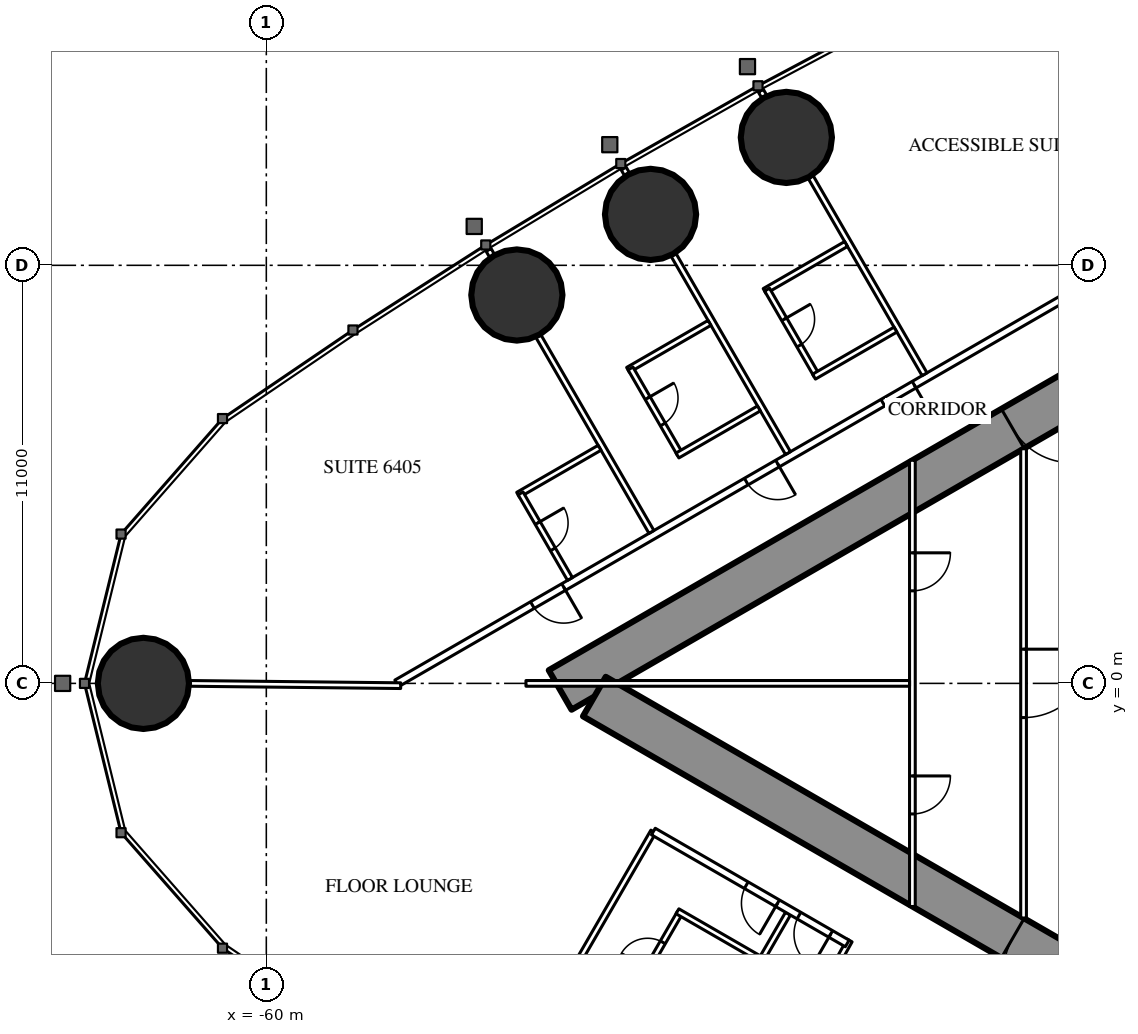
"""IFC4 building model, lengths in metres.
Left out: names, types, materials, properties, quantities, classifications, styles, units other than length and angle.
Written with IfcOpenShell. Run it as: python <this file> out.ifc"""

import sys

from ifc_helpers import new_model, si_unit, direction, frame, frame_2d, origin, origin_2d, place, context, subcontext, project, spatial, rectangle, circle, extrude, element, fill, save


model = new_model("IFC4")
c1 = context("Model", 3, precision=1e-05, world=origin(), true_north=direction((0.0, 1.0)))
c2 = subcontext(c1, "Body", "Model", "MODEL_VIEW")
j1 = project(units=[si_unit("LENGTHUNIT", "METRE"), si_unit("PLANEANGLEUNIT", "RADIAN")], contexts=[c1])
p1 = place(None, origin())
s1 = spatial("IfcSite", under=j1, at=p1, CompositionType="ELEMENT")
p2 = place(p1, origin())
s2 = spatial("IfcBuilding", under=s1, at=p2, CompositionType="ELEMENT")
p3 = place(p2, frame((0.0, 0.0, 240.5)))
s3 = spatial("IfcBuildingStorey", under=s2, at=p3, CompositionType="ELEMENT", Elevation=240.5)
for number, where, z_axis, x_axis in (
    (1, (-63.234, 0.0, 0.0), (0.0, 0.0, 1.0), (1.0, 0.0, 0.0)),
    (2, (-46.317, 14.365, 0.0), (0.0, 0.0, 1.0), (1.0, 0.0, 0.0)),
    (3, (-49.89, 12.34, 0.0), (0.0, 0.0, 1.0), (1.0, 0.0, 0.0)),
    (4, (-53.408, 10.219, 0.0), (0.0, 0.0, 1.0), (1.0, 0.0, 0.0)),
):
    element("IfcColumn", number, at=place(p3, frame(where, z_axis=z_axis, x_axis=x_axis)), inside=s3, PredefinedType="COLUMN", context=c2, shape_type="SweptSolid", body=[
        extrude(circle(Radius=1.2, at=origin_2d()), origin(), (0.0, 0.0, 1.0), 3.6),
    ])
p4 = place(p3, frame((-27.2, 14.3, 0.0), z_axis=(0.0, 0.0, 1.0), x_axis=(-0.866026593062, -0.499997940104, 0.0)))
e5 = element("IfcWall", 5, at=p4, inside=s3, PredefinedType="SHEAR", context=c2, shape_type="SweptSolid", body=[
    extrude(rectangle(XDim=28.946, YDim=1.2, at=frame_2d((14.473, 0.0))), origin(), (0.0, 0.0, 1.0), 3.6),
])
p5 = place(p4, frame((4.6, 0.0, 0.0)))
e6 = element("IfcOpeningElement", 6, at=p5, cuts=e5, PredefinedType="OPENING", context=c2, shape_type="SweptSolid", body=[
    extrude(rectangle(XDim=1.0, YDim=2.2, at=frame_2d((0.5, 1.1))), frame((0.0, 0.61, 0.0), z_axis=(0.0, -1.0, 0.0), x_axis=(1.0, 0.0, 0.0)), (0.0, 0.0, 1.0), 1.22),
])
p6 = place(p4, frame((13.395, 0.0, 0.0)))
e7 = element("IfcOpeningElement", 7, at=p6, cuts=e5, PredefinedType="OPENING", context=c2, shape_type="SweptSolid", body=[
    extrude(rectangle(XDim=1.8, YDim=2.2, at=frame_2d((0.9, 1.1))), frame((0.0, 0.61, 0.0), z_axis=(0.0, -1.0, 0.0), x_axis=(1.0, 0.0, 0.0)), (0.0, 0.0, 1.0), 1.22),
])
p7 = place(p3, frame((-27.2, -14.3, 0.0), z_axis=(0.0, 0.0, 1.0), x_axis=(-0.866024021859, 0.500002393557, 0.0)))
e8 = element("IfcWall", 8, at=p7, inside=s3, PredefinedType="SHEAR", context=c2, shape_type="SweptSolid", body=[
    extrude(rectangle(XDim=27.907, YDim=1.2, at=frame_2d((13.954, 0.0))), origin(), (0.0, 0.0, 1.0), 3.6),
])
p8 = place(p7, frame((4.6, 0.0, 0.0)))
e9 = element("IfcOpeningElement", 9, at=p8, cuts=e8, PredefinedType="OPENING", context=c2, shape_type="SweptSolid", body=[
    extrude(rectangle(XDim=1.0, YDim=2.2, at=frame_2d((0.5, 1.1))), frame((0.0, 0.61, 0.0), z_axis=(0.0, -1.0, 0.0), x_axis=(1.0, 0.0, 0.0)), (0.0, 0.0, 1.0), 1.22),
])
p9 = place(p7, frame((13.395, 0.0, 0.0)))
e10 = element("IfcOpeningElement", 10, at=p9, cuts=e8, PredefinedType="OPENING", context=c2, shape_type="SweptSolid", body=[
    extrude(rectangle(XDim=1.8, YDim=2.2, at=frame_2d((0.9, 1.1))), frame((0.0, 0.61, 0.0), z_axis=(0.0, -1.0, 0.0), x_axis=(1.0, 0.0, 0.0)), (0.0, 0.0, 1.0), 1.22),
])
p10 = place(p3, frame((-28.737, 16.068, 0.0), z_axis=(0.0, 0.0, 1.0), x_axis=(-0.866026057212, -0.499998868229, 0.0)))
e11 = element("IfcWall", 11, at=p10, inside=s3, PredefinedType="PARTITIONING", context=c2, shape_type="SweptSolid", body=[
    extrude(rectangle(XDim=32.137, YDim=0.2, at=frame_2d((16.068, 0.0))), origin(), (0.0, 0.0, 1.0), 3.35),
])
p11 = place(p10, frame((1.08, 0.0, 0.0)))
e12 = element("IfcOpeningElement", 12, at=p11, cuts=e11, PredefinedType="OPENING", context=c2, shape_type="SweptSolid", body=[
    extrude(rectangle(XDim=1.8, YDim=2.03, at=frame_2d((0.9, 1.015))), frame((0.0, 0.11, 0.0), z_axis=(0.0, -1.0, 0.0), x_axis=(1.0, 0.0, 0.0)), (0.0, 0.0, 1.0), 0.22),
])
p12 = place(p10, frame((6.86, 0.0, 0.0)))
e13 = element("IfcOpeningElement", 13, at=p12, cuts=e11, PredefinedType="OPENING", context=c2, shape_type="SweptSolid", body=[
    extrude(rectangle(XDim=1.0, YDim=2.2, at=frame_2d((0.5, 1.1))), frame((0.0, 0.11, 0.0), z_axis=(0.0, -1.0, 0.0), x_axis=(1.0, 0.0, 0.0)), (0.0, 0.0, 1.0), 0.22),
])
p13 = place(p10, frame((16.418, 0.0, 0.0)))
e14 = element("IfcOpeningElement", 14, at=p13, cuts=e11, PredefinedType="OPENING", context=c2, shape_type="SweptSolid", body=[
    extrude(rectangle(XDim=0.95, YDim=2.2, at=frame_2d((0.475, 1.1))), frame((0.0, 0.11, 0.0), z_axis=(0.0, -1.0, 0.0), x_axis=(1.0, 0.0, 0.0)), (0.0, 0.0, 1.0), 0.22),
])
p14 = place(p10, frame((20.567, 0.0, 0.0)))
e15 = element("IfcOpeningElement", 15, at=p14, cuts=e11, PredefinedType="OPENING", context=c2, shape_type="SweptSolid", body=[
    extrude(rectangle(XDim=0.95, YDim=2.2, at=frame_2d((0.475, 1.1))), frame((0.0, 0.11, 0.0), z_axis=(0.0, -1.0, 0.0), x_axis=(1.0, 0.0, 0.0)), (0.0, 0.0, 1.0), 0.22),
])
p15 = place(p10, frame((27.065, 0.0, 0.0)))
e16 = element("IfcOpeningElement", 16, at=p15, cuts=e11, PredefinedType="OPENING", context=c2, shape_type="SweptSolid", body=[
    extrude(rectangle(XDim=0.95, YDim=2.2, at=frame_2d((0.475, 1.1))), frame((0.0, 0.11, 0.0), z_axis=(0.0, -1.0, 0.0), x_axis=(1.0, 0.0, 0.0)), (0.0, 0.0, 1.0), 0.22),
])
p16 = place(p3, frame((-42.68, 8.134, 0.0), z_axis=(0.0, 0.0, 1.0), x_axis=(-0.499984479505, 0.866034364361, 0.0)))
e17 = element("IfcWall", 17, at=p16, inside=s3, PredefinedType="PARTITIONING", context=c2, shape_type="SweptSolid", body=[
    extrude(rectangle(XDim=5.995, YDim=0.15, at=frame_2d((2.998, 0.0))), origin(), (0.0, 0.0, 1.0), 2.45),
])
p17 = place(p3, frame((-46.898, 15.439, 0.0), z_axis=(0.0, 0.0, 1.0), x_axis=(-0.500232303069, 0.865891241997, 0.0)))
e18 = element("IfcWall", 18, at=p17, inside=s3, PredefinedType="PARTITIONING", context=c2, shape_type="SweptSolid", body=[
    extrude(rectangle(XDim=0.18, YDim=0.15, at=frame_2d((0.09, 0.0))), origin(), (0.0, 0.0, 1.0), 2.45),
])
p18 = place(p3, frame((-46.274, 6.059, 0.0), z_axis=(0.0, 0.0, 1.0), x_axis=(-0.500020471368, 0.866013584312, 0.0)))
e19 = element("IfcWall", 19, at=p18, inside=s3, PredefinedType="PARTITIONING", context=c2, shape_type="SweptSolid", body=[
    extrude(rectangle(XDim=6.028, YDim=0.15, at=frame_2d((3.014, 0.0))), origin(), (0.0, 0.0, 1.0), 2.45),
])
p19 = place(p3, frame((-50.508, 13.392, 0.0), z_axis=(0.0, 0.0, 1.0), x_axis=(-0.499644091975, 0.866230789891, 0.0)))
e20 = element("IfcWall", 20, at=p19, inside=s3, PredefinedType="PARTITIONING", context=c2, shape_type="SweptSolid", body=[
    extrude(rectangle(XDim=0.18, YDim=0.15, at=frame_2d((0.09, 0.0))), origin(), (0.0, 0.0, 1.0), 2.45),
])
p20 = place(p3, frame((-49.866, 3.985, 0.0), z_axis=(0.0, 0.0, 1.0), x_axis=(-0.500000694566, 0.866025002776, 0.0)))
e21 = element("IfcWall", 21, at=p20, inside=s3, PredefinedType="PARTITIONING", context=c2, shape_type="SweptSolid", body=[
    extrude(rectangle(XDim=5.95, YDim=0.15, at=frame_2d((2.975, 0.0))), origin(), (0.0, 0.0, 1.0), 2.45),
])
p21 = place(p3, frame((-54.061, 11.25, 0.0), z_axis=(0.0, 0.0, 1.0), x_axis=(-0.500391173478, 0.865799441849, 0.0)))
e22 = element("IfcWall", 22, at=p21, inside=s3, PredefinedType="PARTITIONING", context=c2, shape_type="SweptSolid", body=[
    extrude(rectangle(XDim=0.179, YDim=0.15, at=frame_2d((0.089, 0.0))), origin(), (0.0, 0.0, 1.0), 2.45),
])
p22 = place(p3, frame((-46.274, -6.059, 0.0), z_axis=(0.0, 0.0, 1.0), x_axis=(-0.500020471368, -0.866013584312, 0.0)))
e23 = element("IfcWall", 23, at=p22, inside=s3, PredefinedType="PARTITIONING", context=c2, shape_type="SweptSolid", body=[
    extrude(rectangle(XDim=6.028, YDim=0.15, at=frame_2d((3.014, 0.0))), origin(), (0.0, 0.0, 1.0), 2.45),
])
p23 = place(p3, frame((-49.816, -3.898, 0.0), z_axis=(0.0, 0.0, 1.0), x_axis=(-0.500001913541, -0.866024298998, 0.0)))
e24 = element("IfcWall", 24, at=p23, inside=s3, PredefinedType="PARTITIONING", context=c2, shape_type="SweptSolid", body=[
    extrude(rectangle(XDim=6.05, YDim=0.15, at=frame_2d((3.025, 0.0))), origin(), (0.0, 0.0, 1.0), 2.45),
])
p24 = place(p3, frame((-56.464, -0.06, 0.0), z_axis=(0.0, 0.0, 1.0), x_axis=(-0.999941455167, 0.01082063951, 0.0)))
e25 = element("IfcWall", 25, at=p24, inside=s3, PredefinedType="PARTITIONING", context=c2, shape_type="SweptSolid", body=[
    extrude(rectangle(XDim=5.55, YDim=0.15, at=frame_2d((2.775, 0.0))), origin(), (0.0, 0.0, 1.0), 2.45),
])
p25 = place(p3, frame((-44.652, -6.764, 0.0), z_axis=(0.0, 0.0, 1.0), x_axis=(-0.485424724123, -0.874278466629, 0.0)))
e26 = element("IfcWall", 26, at=p25, inside=s3, PredefinedType="PARTITIONING", context=c2, shape_type="SweptSolid", body=[
    extrude(rectangle(XDim=1.805, YDim=0.15, at=frame_2d((0.903, 0.0))), origin(), (0.0, 0.0, 1.0), 3.35),
])
p26 = place(p3, frame((-44.745, 11.56, 0.0), z_axis=(0.0, 0.0, 1.0), x_axis=(-0.866006523861, -0.500032699561, 0.0)))
e27 = element("IfcWall", 27, at=p26, inside=s3, PredefinedType="PARTITIONING", context=c2, shape_type="SweptSolid", body=[
    extrude(rectangle(XDim=2.475, YDim=0.15, at=frame_2d((1.237, 0.0))), origin(), (0.0, 0.0, 1.0), 3.35),
])
p27 = place(p3, frame((-45.524, 8.109, 0.0), z_axis=(0.0, 0.0, 1.0), x_axis=(-0.49997716683, 0.86603858612, 0.0)))
e28 = element("IfcWall", 28, at=p27, inside=s3, PredefinedType="PARTITIONING", context=c2, shape_type="SweptSolid", body=[
    extrude(rectangle(XDim=2.6, YDim=0.15, at=frame_2d((1.3, 0.0))), origin(), (0.0, 0.0, 1.0), 3.35),
])
p28 = place(p27, frame((0.9, 0.0, 0.0)))
e29 = element("IfcOpeningElement", 29, at=p28, cuts=e28, PredefinedType="OPENING", context=c2, shape_type="SweptSolid", body=[
    extrude(rectangle(XDim=0.8, YDim=2.2, at=frame_2d((0.4, 1.1))), frame((0.0, 0.085, 0.0), z_axis=(0.0, -1.0, 0.0), x_axis=(1.0, 0.0, 0.0)), (0.0, 0.0, 1.0), 0.17),
])
p29 = place(p3, frame((-43.445, 9.309, 0.0), z_axis=(0.0, 0.0, 1.0), x_axis=(-0.866031185235, -0.4999899861, 0.0)))
e30 = element("IfcWall", 30, at=p29, inside=s3, PredefinedType="PARTITIONING", context=c2, shape_type="SweptSolid", body=[
    extrude(rectangle(XDim=2.475, YDim=0.15, at=frame_2d((1.238, 0.0))), origin(), (0.0, 0.0, 1.0), 3.35),
])
p30 = place(p3, frame((-48.339, 9.486, 0.0), z_axis=(0.0, 0.0, 1.0), x_axis=(-0.866006523861, -0.500032699561, 0.0)))
e31 = element("IfcWall", 31, at=p30, inside=s3, PredefinedType="PARTITIONING", context=c2, shape_type="SweptSolid", body=[
    extrude(rectangle(XDim=2.475, YDim=0.15, at=frame_2d((1.237, 0.0))), origin(), (0.0, 0.0, 1.0), 3.35),
])
p31 = place(p3, frame((-49.117, 6.034, 0.0), z_axis=(0.0, 0.0, 1.0), x_axis=(-0.500006934395, 0.866021400173, 0.0)))
e32 = element("IfcWall", 32, at=p31, inside=s3, PredefinedType="PARTITIONING", context=c2, shape_type="SweptSolid", body=[
    extrude(rectangle(XDim=2.6, YDim=0.15, at=frame_2d((1.3, 0.0))), origin(), (0.0, 0.0, 1.0), 3.35),
])
p32 = place(p31, frame((0.9, 0.0, 0.0)))
e33 = element("IfcOpeningElement", 33, at=p32, cuts=e32, PredefinedType="OPENING", context=c2, shape_type="SweptSolid", body=[
    extrude(rectangle(XDim=0.8, YDim=2.2, at=frame_2d((0.4, 1.1))), frame((0.0, 0.085, 0.0), z_axis=(0.0, -1.0, 0.0), x_axis=(1.0, 0.0, 0.0)), (0.0, 0.0, 1.0), 0.17),
])
for number, where, z_axis, x_axis in (
    (34, (-47.039, 7.234, 0.0), (0.0, 0.0, 1.0), (-0.866, -0.5, 0.0)),
    (35, (-51.231, 6.199, 0.0), (0.0, 0.0, 1.0), (-0.866, -0.5, 0.0)),
):
    element("IfcWall", number, at=place(p3, frame(where, z_axis=z_axis, x_axis=x_axis)), inside=s3, PredefinedType="PARTITIONING", context=c2, shape_type="SweptSolid", body=[
        extrude(rectangle(XDim=2.475, YDim=0.15, at=frame_2d((1.238, 0.0))), origin(), (0.0, 0.0, 1.0), 3.35),
    ])
p33 = place(p3, frame((-52.01, 2.747, 0.0), z_axis=(0.0, 0.0, 1.0), x_axis=(-0.500006934395, 0.866021400173, 0.0)))
e36 = element("IfcWall", 36, at=p33, inside=s3, PredefinedType="PARTITIONING", context=c2, shape_type="SweptSolid", body=[
    extrude(rectangle(XDim=2.6, YDim=0.15, at=frame_2d((1.3, 0.0))), origin(), (0.0, 0.0, 1.0), 3.35),
])
p34 = place(p33, frame((0.9, 0.0, 0.0)))
e37 = element("IfcOpeningElement", 37, at=p34, cuts=e36, PredefinedType="OPENING", context=c2, shape_type="SweptSolid", body=[
    extrude(rectangle(XDim=0.8, YDim=2.2, at=frame_2d((0.4, 1.1))), frame((0.0, 0.085, 0.0), z_axis=(0.0, -1.0, 0.0), x_axis=(1.0, 0.0, 0.0)), (0.0, 0.0, 1.0), 0.17),
])
p35 = place(p3, frame((-49.117, -6.034, 0.0), z_axis=(0.0, 0.0, 1.0), x_axis=(-0.500006934395, -0.866021400173, 0.0)))
e38 = element("IfcWall", 38, at=p35, inside=s3, PredefinedType="PARTITIONING", context=c2, shape_type="SweptSolid", body=[
    extrude(rectangle(XDim=2.6, YDim=0.15, at=frame_2d((1.3, 0.0))), origin(), (0.0, 0.0, 1.0), 3.35),
])
p36 = place(p35, frame((0.9, 0.0, 0.0)))
e39 = element("IfcOpeningElement", 39, at=p36, cuts=e38, PredefinedType="OPENING", context=c2, shape_type="SweptSolid", body=[
    extrude(rectangle(XDim=0.8, YDim=2.2, at=frame_2d((0.4, 1.1))), frame((0.0, 0.085, 0.0), z_axis=(0.0, -1.0, 0.0), x_axis=(1.0, 0.0, 0.0)), (0.0, 0.0, 1.0), 0.17),
])
p37 = place(p3, frame((-47.039, -7.234, 0.0), z_axis=(0.0, 0.0, 1.0), x_axis=(-0.866073894602, 0.499916002032, 0.0)))
e40 = element("IfcWall", 40, at=p37, inside=s3, PredefinedType="PARTITIONING", context=c2, shape_type="SweptSolid", body=[
    extrude(rectangle(XDim=2.475, YDim=0.15, at=frame_2d((1.238, 0.0))), origin(), (0.0, 0.0, 1.0), 2.5),
])
p38 = place(p3, frame((-44.715, -6.844, 0.0), z_axis=(0.0, 0.0, 1.0), x_axis=(-0.866020627653, 0.50000827241, 0.0)))
e41 = element("IfcWall", 41, at=p38, inside=s3, PredefinedType="PARTITIONING", context=c2, shape_type="SweptSolid", body=[
    extrude(rectangle(XDim=5.891, YDim=0.2, at=frame_2d((2.945, 0.0))), origin(), (0.0, 0.0, 1.0), 3.35),
])
p39 = place(p38, frame((2.117, 0.0, 0.0)))
e42 = element("IfcOpeningElement", 42, at=p39, cuts=e41, PredefinedType="OPENING", context=c2, shape_type="SweptSolid", body=[
    extrude(rectangle(XDim=0.95, YDim=2.2, at=frame_2d((0.475, 1.1))), frame((0.0, 0.11, 0.0), z_axis=(0.0, -1.0, 0.0), x_axis=(1.0, 0.0, 0.0)), (0.0, 0.0, 1.0), 0.22),
])
p40 = place(p38, frame((0.5, 0.0, 0.0)))
e43 = element("IfcOpeningElement", 43, at=p40, cuts=e41, PredefinedType="OPENING", context=c2, shape_type="SweptSolid", body=[
    extrude(rectangle(XDim=0.967, YDim=2.2, at=frame_2d((0.483, 1.1))), frame((0.0, 0.11, 0.0), z_axis=(0.0, -1.0, 0.0), x_axis=(1.0, 0.0, 0.0)), (0.0, 0.0, 1.0), 0.22),
])
p41 = place(p3, frame((-40.075, 6.174, 0.0), z_axis=(0.0, 0.0, 1.0), x_axis=(0.0, -1.0, 0.0)))
e44 = element("IfcWall", 44, at=p41, inside=s3, PredefinedType="PARTITIONING", context=c2, shape_type="SweptSolid", body=[
    extrude(rectangle(XDim=12.348, YDim=0.15, at=frame_2d((6.174, 0.0))), origin(), (0.0, 0.0, 1.0), 3.35),
])
p42 = place(p41, frame((5.274, 0.0, 0.0)))
e45 = element("IfcOpeningElement", 45, at=p42, cuts=e44, PredefinedType="OPENING", context=c2, shape_type="SweptSolid", body=[
    extrude(rectangle(XDim=1.8, YDim=2.2, at=frame_2d((0.9, 1.1))), frame((0.0, 0.085, 0.0), z_axis=(0.0, -1.0, 0.0), x_axis=(1.0, 0.0, 0.0)), (0.0, 0.0, 1.0), 0.17),
])
p43 = place(p3, frame((-43.0, 5.871, 0.0), z_axis=(0.0, 0.0, 1.0), x_axis=(0.0, -1.0, 0.0)))
e46 = element("IfcWall", 46, at=p43, inside=s3, PredefinedType="PARTITIONING", context=c2, shape_type="SweptSolid", body=[
    extrude(rectangle(XDim=11.741, YDim=0.15, at=frame_2d((5.871, 0.0))), origin(), (0.0, 0.0, 1.0), 3.35),
])
p44 = place(p43, frame((2.435, 0.0, 0.0)))
e47 = element("IfcOpeningElement", 47, at=p44, cuts=e46, PredefinedType="OPENING", context=c2, shape_type="SweptSolid", body=[
    extrude(rectangle(XDim=1.0, YDim=2.2, at=frame_2d((0.5, 1.1))), frame((0.0, 0.085, 0.0), z_axis=(0.0, -1.0, 0.0), x_axis=(1.0, 0.0, 0.0)), (0.0, 0.0, 1.0), 0.17),
])
p45 = place(p43, frame((8.306, 0.0, 0.0)))
e48 = element("IfcOpeningElement", 48, at=p45, cuts=e46, PredefinedType="OPENING", context=c2, shape_type="SweptSolid", body=[
    extrude(rectangle(XDim=1.0, YDim=2.2, at=frame_2d((0.5, 1.1))), frame((0.0, 0.085, 0.0), z_axis=(0.0, -1.0, 0.0), x_axis=(1.0, 0.0, 0.0)), (0.0, 0.0, 1.0), 0.17),
])
p46 = place(p3, frame((-43.075, 0.0, 0.0), z_axis=(0.0, 0.0, 1.0), x_axis=(-1.0, 0.0, 0.0)))
e49 = element("IfcWall", 49, at=p46, inside=s3, PredefinedType="PARTITIONING", context=c2, shape_type="SweptSolid", body=[
    extrude(rectangle(XDim=10.093, YDim=0.15, at=frame_2d((5.047, 0.0))), origin(), (0.0, 0.0, 1.0), 2.45),
])
p47 = place(p28, origin())
e50 = element("IfcDoor", 50, at=p47, inside=s3, OperationType="SINGLE_SWING_RIGHT", PredefinedType="DOOR", context=c2, shape_type="SweptSolid", body=[
    extrude(rectangle(XDim=0.8, YDim=2.2, at=frame_2d((0.4, 1.1))), frame((0.0, 0.025, 0.0), z_axis=(0.0, -1.0, 0.0), x_axis=(1.0, 0.0, 0.0)), (0.0, 0.0, 1.0), 0.05),
])
fill(e29, e50)
p48 = place(p13, origin())
e51 = element("IfcDoor", 51, at=p48, inside=s3, OperationType="SINGLE_SWING_LEFT", PredefinedType="DOOR", context=c2, shape_type="SweptSolid", body=[
    extrude(rectangle(XDim=0.95, YDim=2.2, at=frame_2d((0.475, 1.1))), frame((0.0, 0.025, 0.0), z_axis=(0.0, -1.0, 0.0), x_axis=(1.0, 0.0, 0.0)), (0.0, 0.0, 1.0), 0.05),
])
fill(e14, e51)
p49 = place(p32, origin())
e52 = element("IfcDoor", 52, at=p49, inside=s3, OperationType="SINGLE_SWING_RIGHT", PredefinedType="DOOR", context=c2, shape_type="SweptSolid", body=[
    extrude(rectangle(XDim=0.8, YDim=2.2, at=frame_2d((0.4, 1.1))), frame((0.0, 0.025, 0.0), z_axis=(0.0, -1.0, 0.0), x_axis=(1.0, 0.0, 0.0)), (0.0, 0.0, 1.0), 0.05),
])
fill(e33, e52)
p50 = place(p14, origin())
e53 = element("IfcDoor", 53, at=p50, inside=s3, OperationType="SINGLE_SWING_LEFT", PredefinedType="DOOR", context=c2, shape_type="SweptSolid", body=[
    extrude(rectangle(XDim=0.95, YDim=2.2, at=frame_2d((0.475, 1.1))), frame((0.0, 0.025, 0.0), z_axis=(0.0, -1.0, 0.0), x_axis=(1.0, 0.0, 0.0)), (0.0, 0.0, 1.0), 0.05),
])
fill(e15, e53)
p51 = place(p34, origin())
e54 = element("IfcDoor", 54, at=p51, inside=s3, OperationType="SINGLE_SWING_RIGHT", PredefinedType="DOOR", context=c2, shape_type="SweptSolid", body=[
    extrude(rectangle(XDim=0.8, YDim=2.2, at=frame_2d((0.4, 1.1))), frame((0.0, 0.025, 0.0), z_axis=(0.0, -1.0, 0.0), x_axis=(1.0, 0.0, 0.0)), (0.0, 0.0, 1.0), 0.05),
])
fill(e37, e54)
p52 = place(p15, origin())
e55 = element("IfcDoor", 55, at=p52, inside=s3, OperationType="SINGLE_SWING_LEFT", PredefinedType="DOOR", context=c2, shape_type="SweptSolid", body=[
    extrude(rectangle(XDim=0.95, YDim=2.2, at=frame_2d((0.475, 1.1))), frame((0.0, 0.025, 0.0), z_axis=(0.0, -1.0, 0.0), x_axis=(1.0, 0.0, 0.0)), (0.0, 0.0, 1.0), 0.05),
])
fill(e16, e55)
p53 = place(p36, origin())
e56 = element("IfcDoor", 56, at=p53, inside=s3, OperationType="SINGLE_SWING_RIGHT", PredefinedType="DOOR", context=c2, shape_type="SweptSolid", body=[
    extrude(rectangle(XDim=0.8, YDim=2.2, at=frame_2d((0.4, 1.1))), frame((0.0, 0.025, 0.0), z_axis=(0.0, -1.0, 0.0), x_axis=(1.0, 0.0, 0.0)), (0.0, 0.0, 1.0), 0.05),
])
fill(e39, e56)
p54 = place(p39, origin())
e57 = element("IfcDoor", 57, at=p54, inside=s3, OperationType="SINGLE_SWING_LEFT", PredefinedType="DOOR", context=c2, shape_type="SweptSolid", body=[
    extrude(rectangle(XDim=0.95, YDim=2.2, at=frame_2d((0.475, 1.1))), frame((0.0, 0.025, 0.0), z_axis=(0.0, -1.0, 0.0), x_axis=(1.0, 0.0, 0.0)), (0.0, 0.0, 1.0), 0.05),
])
fill(e42, e57)
p55 = place(p40, origin())
e58 = element("IfcDoor", 58, at=p55, inside=s3, OperationType="SINGLE_SWING_LEFT", PredefinedType="DOOR", context=c2, shape_type="SweptSolid", body=[
    extrude(rectangle(XDim=0.967, YDim=2.2, at=frame_2d((0.483, 1.1))), frame((0.0, 0.025, 0.0), z_axis=(0.0, -1.0, 0.0), x_axis=(1.0, 0.0, 0.0)), (0.0, 0.0, 1.0), 0.05),
])
fill(e43, e58)
p56 = place(p42, origin())
e59 = element("IfcDoor", 59, at=p56, inside=s3, OperationType="DOUBLE_DOOR_SINGLE_SWING", PredefinedType="DOOR", context=c2, shape_type="SweptSolid", body=[
    extrude(rectangle(XDim=1.8, YDim=2.2, at=frame_2d((0.9, 1.1))), frame((0.0, 0.025, 0.0), z_axis=(0.0, -1.0, 0.0), x_axis=(1.0, 0.0, 0.0)), (0.0, 0.0, 1.0), 0.05),
])
fill(e45, e59)
p57 = place(p44, origin())
e60 = element("IfcDoor", 60, at=p57, inside=s3, OperationType="SINGLE_SWING_LEFT", PredefinedType="DOOR", context=c2, shape_type="SweptSolid", body=[
    extrude(rectangle(XDim=1.0, YDim=2.2, at=frame_2d((0.5, 1.1))), frame((0.0, 0.025, 0.0), z_axis=(0.0, -1.0, 0.0), x_axis=(1.0, 0.0, 0.0)), (0.0, 0.0, 1.0), 0.05),
])
fill(e47, e60)
p58 = place(p45, origin())
e61 = element("IfcDoor", 61, at=p58, inside=s3, OperationType="SINGLE_SWING_LEFT", PredefinedType="DOOR", context=c2, shape_type="SweptSolid", body=[
    extrude(rectangle(XDim=1.0, YDim=2.2, at=frame_2d((0.5, 1.1))), frame((0.0, 0.025, 0.0), z_axis=(0.0, -1.0, 0.0), x_axis=(1.0, 0.0, 0.0)), (0.0, 0.0, 1.0), 0.05),
])
fill(e48, e61)
p59 = place(p6, origin())
e62 = element("IfcDoor", 62, at=p59, inside=s3, OperationType="DOUBLE_DOOR_SINGLE_SWING", PredefinedType="DOOR", context=c2, shape_type="SweptSolid", body=[
    extrude(rectangle(XDim=1.8, YDim=2.2, at=frame_2d((0.9, 1.1))), frame((0.0, 0.025, 0.0), z_axis=(0.0, -1.0, 0.0), x_axis=(1.0, 0.0, 0.0)), (0.0, 0.0, 1.0), 0.05),
])
fill(e7, e62)
p60 = place(p9, origin())
e63 = element("IfcDoor", 63, at=p60, inside=s3, OperationType="DOUBLE_DOOR_SINGLE_SWING", PredefinedType="DOOR", context=c2, shape_type="SweptSolid", body=[
    extrude(rectangle(XDim=1.8, YDim=2.2, at=frame_2d((0.9, 1.1))), frame((0.0, 0.025, 0.0), z_axis=(0.0, -1.0, 0.0), x_axis=(1.0, 0.0, 0.0)), (0.0, 0.0, 1.0), 0.05),
])
fill(e10, e63)
save(model, sys.argv[1])
